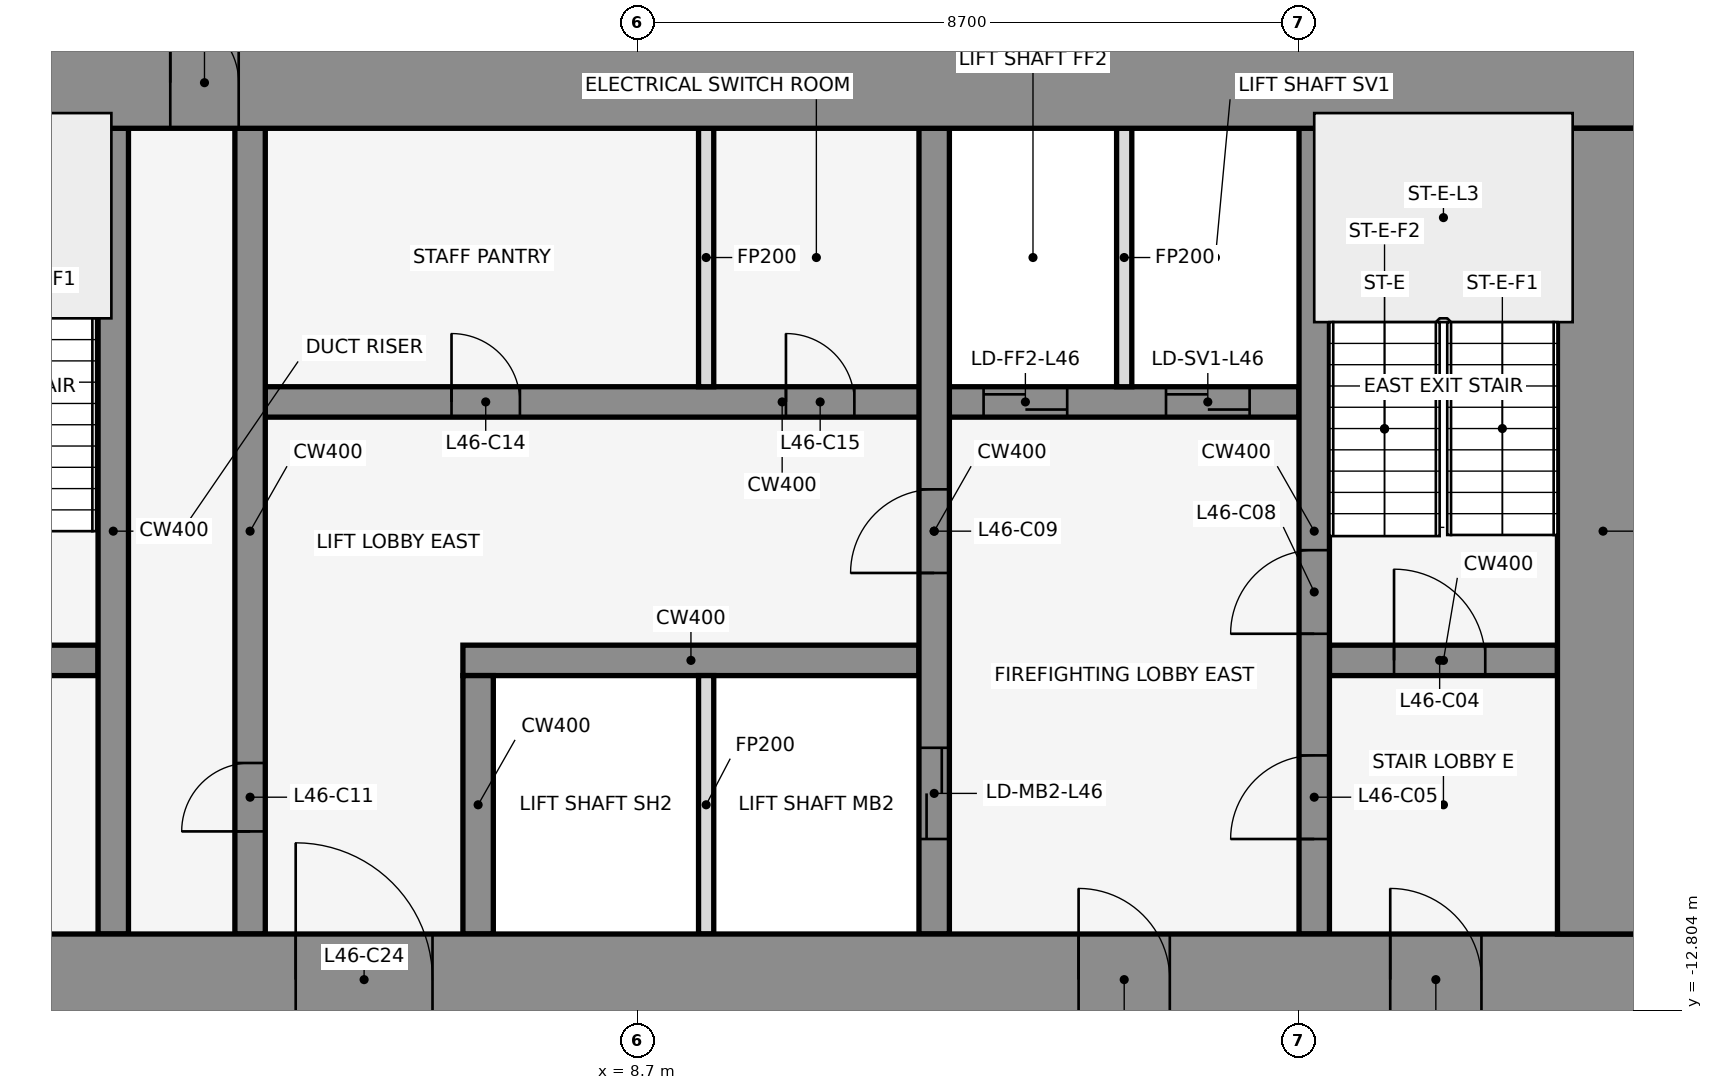
"""IFC4 building model, lengths in metres.
Left out: names, types, materials, properties, quantities, classifications, styles, units other than length and angle.
Written with IfcOpenShell. Run it as: python <this file> out.ifc"""

import sys

from ifc_helpers import new_model, si_unit, direction, frame, frame_2d, origin, place, context, subcontext, project, spatial, rectangle, extrude, element, fill, save


model = new_model("IFC4")
c1 = context("Model", 3, precision=1e-05, world=origin(), true_north=direction((0.0, 1.0)))
c2 = subcontext(c1, "Body", "Model", "MODEL_VIEW")
j1 = project(units=[si_unit("LENGTHUNIT", "METRE"), si_unit("PLANEANGLEUNIT", "RADIAN")], contexts=[c1])
p1 = place(None, origin())
s1 = spatial("IfcSite", under=j1, at=p1, CompositionType="ELEMENT")
p2 = place(p1, origin())
s2 = spatial("IfcBuilding", under=s1, at=p2, CompositionType="ELEMENT")
p3 = place(p2, frame((0.0, 0.0, 207.3)))
s3 = spatial("IfcBuildingStorey", under=s2, at=p3, CompositionType="ELEMENT", Elevation=207.3)
for number, where, z_axis, x_axis in (
    (1, (16.432, -0.105, 0.0), (0.0, 0.0, 1.0), (-0.84, 0.543, 0.0)),
    (2, (1.901, 1.08, 0.0), (0.0, 0.0, 1.0), (-0.84, -0.543, 0.0)),
):
    element("IfcWall", number, at=place(p3, frame(where, z_axis=z_axis, x_axis=x_axis)), inside=s3, PredefinedType="STANDARD", context=c2, shape_type="SweptSolid", body=[
        extrude(rectangle(XDim=2.183, YDim=0.25, at=frame_2d((1.091, 0.0))), origin(), (0.0, 0.0, 1.0), 3.95),
    ])
p4 = place(p3, frame((-1.6, -8.2, 0.0), z_axis=(0.0, 0.0, 1.0), x_axis=(1.0, 0.0, 0.0)))
e3 = element("IfcWall", 3, at=p4, inside=s3, PredefinedType="SHEAR", context=c2, shape_type="SweptSolid", body=[
    extrude(rectangle(XDim=3.2, YDim=0.4, at=frame_2d((1.6, 0.0))), origin(), (0.0, 0.0, 1.0), 4.1),
])
p5 = place(p4, frame((1.05, 0.0, 0.0)))
e4 = element("IfcOpeningElement", 4, at=p5, cuts=e3, PredefinedType="OPENING", context=c2, shape_type="SweptSolid", body=[
    extrude(rectangle(XDim=1.2, YDim=2.1, at=frame_2d((0.6, 1.05))), frame((0.0, 0.212, 0.0), z_axis=(0.0, -1.0, 0.0), x_axis=(1.0, 0.0, 0.0)), (0.0, 0.0, 1.0), 0.424),
])
p6 = place(p3, frame((6.4, -8.2, 0.0), z_axis=(0.0, 0.0, 1.0), x_axis=(1.0, 0.0, 0.0)))
e5 = element("IfcWall", 5, at=p6, inside=s3, PredefinedType="SHEAR", context=c2, shape_type="SweptSolid", body=[
    extrude(rectangle(XDim=6.0, YDim=0.4, at=frame_2d((3.0, 0.0))), origin(), (0.0, 0.0, 1.0), 4.1),
])
p7 = place(p3, frame((17.8, -8.2, 0.0), z_axis=(0.0, 0.0, 1.0), x_axis=(1.0, 0.0, 0.0)))
e6 = element("IfcWall", 6, at=p7, inside=s3, PredefinedType="SHEAR", context=c2, shape_type="SweptSolid", body=[
    extrude(rectangle(XDim=3.0, YDim=0.4, at=frame_2d((1.5, 0.0))), origin(), (0.0, 0.0, 1.0), 4.1),
])
p8 = place(p7, frame((0.85, 0.0, 0.0)))
e7 = element("IfcOpeningElement", 7, at=p8, cuts=e6, PredefinedType="OPENING", context=c2, shape_type="SweptSolid", body=[
    extrude(rectangle(XDim=1.2, YDim=2.1, at=frame_2d((0.6, 1.05))), frame((0.0, 0.212, 0.0), z_axis=(0.0, -1.0, 0.0), x_axis=(1.0, 0.0, 0.0)), (0.0, 0.0, 1.0), 0.424),
])
p9 = place(p3, frame((3.8, -4.8, 0.0), z_axis=(0.0, 0.0, 1.0), x_axis=(1.0, 0.0, 0.0)))
e8 = element("IfcWall", 8, at=p9, inside=s3, PredefinedType="SHEAR", context=c2, shape_type="SweptSolid", body=[
    extrude(rectangle(XDim=13.6, YDim=0.4, at=frame_2d((6.8, 0.0))), origin(), (0.0, 0.0, 1.0), 4.1),
])
p10 = place(p9, frame((9.45, 0.0, 0.0)))
e9 = element("IfcOpeningElement", 9, at=p10, cuts=e8, PredefinedType="OPENING", context=c2, shape_type="SweptSolid", body=[
    extrude(rectangle(XDim=1.1, YDim=2.1, at=frame_2d((0.55, 1.05))), frame((0.0, 0.212, 0.0), z_axis=(0.0, -1.0, 0.0), x_axis=(1.0, 0.0, 0.0)), (0.0, 0.0, 1.0), 0.424),
])
p11 = place(p9, frame((11.85, 0.0, 0.0)))
e10 = element("IfcOpeningElement", 10, at=p11, cuts=e8, PredefinedType="OPENING", context=c2, shape_type="SweptSolid", body=[
    extrude(rectangle(XDim=1.1, YDim=2.1, at=frame_2d((0.55, 1.05))), frame((0.0, 0.212, 0.0), z_axis=(0.0, -1.0, 0.0), x_axis=(1.0, 0.0, 0.0)), (0.0, 0.0, 1.0), 0.424),
])
p12 = place(p9, frame((2.45, 0.0, 0.0)))
e11 = element("IfcOpeningElement", 11, at=p12, cuts=e8, PredefinedType="OPENING", context=c2, shape_type="SweptSolid", body=[
    extrude(rectangle(XDim=0.9, YDim=2.1, at=frame_2d((0.45, 1.05))), frame((0.0, 0.212, 0.0), z_axis=(0.0, -1.0, 0.0), x_axis=(1.0, 0.0, 0.0)), (0.0, 0.0, 1.0), 0.424),
])
p13 = place(p9, frame((6.85, 0.0, 0.0)))
e12 = element("IfcOpeningElement", 12, at=p13, cuts=e8, PredefinedType="OPENING", context=c2, shape_type="SweptSolid", body=[
    extrude(rectangle(XDim=0.9, YDim=2.1, at=frame_2d((0.45, 1.05))), frame((0.0, 0.212, 0.0), z_axis=(0.0, -1.0, 0.0), x_axis=(1.0, 0.0, 0.0)), (0.0, 0.0, 1.0), 0.424),
])
p14 = place(p3, frame((1.8, -11.8, 0.0), z_axis=(0.0, 0.0, 1.0), x_axis=(0.0, 1.0, 0.0)))
e13 = element("IfcWall", 13, at=p14, inside=s3, PredefinedType="SHEAR", context=c2, shape_type="SweptSolid", body=[
    extrude(rectangle(XDim=10.6, YDim=0.4, at=frame_2d((5.3, 0.0))), origin(), (0.0, 0.0, 1.0), 4.1),
])
p15 = place(p3, frame((3.6, -11.8, 0.0), z_axis=(0.0, 0.0, 1.0), x_axis=(0.0, 1.0, 0.0)))
e14 = element("IfcWall", 14, at=p15, inside=s3, PredefinedType="SHEAR", context=c2, shape_type="SweptSolid", body=[
    extrude(rectangle(XDim=10.6, YDim=0.4, at=frame_2d((5.3, 0.0))), origin(), (0.0, 0.0, 1.0), 4.1),
])
p16 = place(p15, frame((1.35, 0.0, 0.0)))
e15 = element("IfcOpeningElement", 15, at=p16, cuts=e14, PredefinedType="OPENING", context=c2, shape_type="SweptSolid", body=[
    extrude(rectangle(XDim=0.9, YDim=2.1, at=frame_2d((0.45, 1.05))), frame((0.0, 0.212, 0.0), z_axis=(0.0, -1.0, 0.0), x_axis=(1.0, 0.0, 0.0)), (0.0, 0.0, 1.0), 0.424),
])
p17 = place(p3, frame((6.6, -11.8, 0.0), z_axis=(0.0, 0.0, 1.0), x_axis=(0.0, 1.0, 0.0)))
e16 = element("IfcWall", 16, at=p17, inside=s3, PredefinedType="SHEAR", context=c2, shape_type="SweptSolid", body=[
    extrude(rectangle(XDim=3.4, YDim=0.4, at=frame_2d((1.7, 0.0))), origin(), (0.0, 0.0, 1.0), 4.1),
])
for number, where, z_axis, x_axis in (
    (17, (9.6, -11.8, 0.0), (0.0, 0.0, 1.0), (0.0, 1.0, 0.0)),
    (18, (9.6, -4.6, 0.0), (0.0, 0.0, 1.0), (0.0, 1.0, 0.0)),
):
    element("IfcWall", number, at=place(p3, frame(where, z_axis=z_axis, x_axis=x_axis)), inside=s3, PredefinedType="PARTITIONING", context=c2, shape_type="SweptSolid", body=[
        extrude(rectangle(XDim=3.4, YDim=0.2, at=frame_2d((1.7, 0.0))), origin(), (0.0, 0.0, 1.0), 2.84),
    ])
p18 = place(p3, frame((12.6, -11.8, 0.0), z_axis=(0.0, 0.0, 1.0), x_axis=(0.0, 1.0, 0.0)))
e19 = element("IfcWall", 19, at=p18, inside=s3, PredefinedType="SHEAR", context=c2, shape_type="SweptSolid", body=[
    extrude(rectangle(XDim=10.6, YDim=0.4, at=frame_2d((5.3, 0.0))), origin(), (0.0, 0.0, 1.0), 4.1),
])
p19 = place(p18, frame((1.25, 0.0, 0.0)))
e20 = element("IfcOpeningElement", 20, at=p19, cuts=e19, PredefinedType="OPENING", context=c2, shape_type="SweptSolid", body=[
    extrude(rectangle(XDim=1.2, YDim=2.1, at=frame_2d((0.6, 1.05))), frame((0.0, 0.212, 0.0), z_axis=(0.0, -1.0, 0.0), x_axis=(1.0, 0.0, 0.0)), (0.0, 0.0, 1.0), 0.424),
])
p20 = place(p18, frame((4.75, 0.0, 0.0)))
e21 = element("IfcOpeningElement", 21, at=p20, cuts=e19, PredefinedType="OPENING", context=c2, shape_type="SweptSolid", body=[
    extrude(rectangle(XDim=1.1, YDim=2.1, at=frame_2d((0.55, 1.05))), frame((0.0, 0.212, 0.0), z_axis=(0.0, -1.0, 0.0), x_axis=(1.0, 0.0, 0.0)), (0.0, 0.0, 1.0), 0.424),
])
p21 = place(p3, frame((15.1, -4.6, 0.0), z_axis=(0.0, 0.0, 1.0), x_axis=(0.0, 1.0, 0.0)))
e22 = element("IfcWall", 22, at=p21, inside=s3, PredefinedType="PARTITIONING", context=c2, shape_type="SweptSolid", body=[
    extrude(rectangle(XDim=3.4, YDim=0.2, at=frame_2d((1.7, 0.0))), origin(), (0.0, 0.0, 1.0), 2.84),
])
p22 = place(p3, frame((17.6, -11.8, 0.0), z_axis=(0.0, 0.0, 1.0), x_axis=(0.0, 1.0, 0.0)))
e23 = element("IfcWall", 23, at=p22, inside=s3, PredefinedType="SHEAR", context=c2, shape_type="SweptSolid", body=[
    extrude(rectangle(XDim=10.6, YDim=0.4, at=frame_2d((5.3, 0.0))), origin(), (0.0, 0.0, 1.0), 4.1),
])
p23 = place(p22, frame((1.25, 0.0, 0.0)))
e24 = element("IfcOpeningElement", 24, at=p23, cuts=e23, PredefinedType="OPENING", context=c2, shape_type="SweptSolid", body=[
    extrude(rectangle(XDim=1.1, YDim=2.1, at=frame_2d((0.55, 1.05))), frame((0.0, 0.212, 0.0), z_axis=(0.0, -1.0, 0.0), x_axis=(1.0, 0.0, 0.0)), (0.0, 0.0, 1.0), 0.424),
])
p24 = place(p22, frame((3.95, 0.0, 0.0)))
e25 = element("IfcOpeningElement", 25, at=p24, cuts=e23, PredefinedType="OPENING", context=c2, shape_type="SweptSolid", body=[
    extrude(rectangle(XDim=1.1, YDim=2.1, at=frame_2d((0.55, 1.05))), frame((0.0, 0.212, 0.0), z_axis=(0.0, -1.0, 0.0), x_axis=(1.0, 0.0, 0.0)), (0.0, 0.0, 1.0), 0.424),
])
p25 = place(p3, frame((-22.0, -0.6, 0.0), z_axis=(0.0, 0.0, 1.0), x_axis=(1.0, 0.0, 0.0)))
e26 = element("IfcWall", 26, at=p25, inside=s3, PredefinedType="SHEAR", context=c2, shape_type="SweptSolid", body=[
    extrude(rectangle(XDim=44.0, YDim=1.2, at=frame_2d((22.0, 0.0))), origin(), (0.0, 0.0, 1.0), 4.1),
])
p26 = place(p25, frame((18.55, 0.0, 0.0)))
e27 = element("IfcOpeningElement", 27, at=p26, cuts=e26, PredefinedType="OPENING", context=c2, shape_type="SweptSolid", body=[
    extrude(rectangle(XDim=0.9, YDim=2.1, at=frame_2d((0.45, 1.05))), frame((0.0, 0.612, 0.0), z_axis=(0.0, -1.0, 0.0), x_axis=(1.0, 0.0, 0.0)), (0.0, 0.0, 1.0), 1.224),
])
p27 = place(p25, frame((24.55, 0.0, 0.0)))
e28 = element("IfcOpeningElement", 28, at=p27, cuts=e26, PredefinedType="OPENING", context=c2, shape_type="SweptSolid", body=[
    extrude(rectangle(XDim=0.9, YDim=2.1, at=frame_2d((0.45, 1.05))), frame((0.0, 0.612, 0.0), z_axis=(0.0, -1.0, 0.0), x_axis=(1.0, 0.0, 0.0)), (0.0, 0.0, 1.0), 1.224),
])
p28 = place(p3, frame((-22.0, -12.4, 0.0), z_axis=(0.0, 0.0, 1.0), x_axis=(1.0, 0.0, 0.0)))
e29 = element("IfcWall", 29, at=p28, inside=s3, PredefinedType="SHEAR", context=c2, shape_type="SweptSolid", body=[
    extrude(rectangle(XDim=44.0, YDim=1.2, at=frame_2d((22.0, 0.0))), origin(), (0.0, 0.0, 1.0), 4.1),
])
p29 = place(p28, frame((2.2, 0.0, 0.0)))
e30 = element("IfcOpeningElement", 30, at=p29, cuts=e29, PredefinedType="OPENING", context=c2, shape_type="SweptSolid", body=[
    extrude(rectangle(XDim=1.2, YDim=2.1, at=frame_2d((0.6, 1.05))), frame((0.0, 0.612, 0.0), z_axis=(0.0, -1.0, 0.0), x_axis=(1.0, 0.0, 0.0)), (0.0, 0.0, 1.0), 1.224),
])
p30 = place(p28, frame((21.4, 0.0, 0.0)))
e31 = element("IfcOpeningElement", 31, at=p30, cuts=e29, PredefinedType="OPENING", context=c2, shape_type="SweptSolid", body=[
    extrude(rectangle(XDim=1.2, YDim=2.1, at=frame_2d((0.6, 1.05))), frame((0.0, 0.612, 0.0), z_axis=(0.0, -1.0, 0.0), x_axis=(1.0, 0.0, 0.0)), (0.0, 0.0, 1.0), 1.224),
])
p31 = place(p28, frame((40.6, 0.0, 0.0)))
e32 = element("IfcOpeningElement", 32, at=p31, cuts=e29, PredefinedType="OPENING", context=c2, shape_type="SweptSolid", body=[
    extrude(rectangle(XDim=1.2, YDim=2.1, at=frame_2d((0.6, 1.05))), frame((0.0, 0.612, 0.0), z_axis=(0.0, -1.0, 0.0), x_axis=(1.0, 0.0, 0.0)), (0.0, 0.0, 1.0), 1.224),
])
p32 = place(p28, frame((16.0, 0.0, 0.0)))
e33 = element("IfcOpeningElement", 33, at=p32, cuts=e29, PredefinedType="OPENING", context=c2, shape_type="SweptSolid", body=[
    extrude(rectangle(XDim=1.8, YDim=2.1, at=frame_2d((0.9, 1.05))), frame((0.0, 0.612, 0.0), z_axis=(0.0, -1.0, 0.0), x_axis=(1.0, 0.0, 0.0)), (0.0, 0.0, 1.0), 1.224),
])
p33 = place(p28, frame((6.3, 0.0, 0.0)))
e34 = element("IfcOpeningElement", 34, at=p33, cuts=e29, PredefinedType="OPENING", context=c2, shape_type="SweptSolid", body=[
    extrude(rectangle(XDim=1.2, YDim=2.1, at=frame_2d((0.6, 1.05))), frame((0.0, 0.612, 0.0), z_axis=(0.0, -1.0, 0.0), x_axis=(1.0, 0.0, 0.0)), (0.0, 0.0, 1.0), 1.224),
])
p34 = place(p28, frame((26.2, 0.0, 0.0)))
e35 = element("IfcOpeningElement", 35, at=p34, cuts=e29, PredefinedType="OPENING", context=c2, shape_type="SweptSolid", body=[
    extrude(rectangle(XDim=1.8, YDim=2.1, at=frame_2d((0.9, 1.05))), frame((0.0, 0.612, 0.0), z_axis=(0.0, -1.0, 0.0), x_axis=(1.0, 0.0, 0.0)), (0.0, 0.0, 1.0), 1.224),
])
p35 = place(p28, frame((36.5, 0.0, 0.0)))
e36 = element("IfcOpeningElement", 36, at=p35, cuts=e29, PredefinedType="OPENING", context=c2, shape_type="SweptSolid", body=[
    extrude(rectangle(XDim=1.2, YDim=2.1, at=frame_2d((0.6, 1.05))), frame((0.0, 0.612, 0.0), z_axis=(0.0, -1.0, 0.0), x_axis=(1.0, 0.0, 0.0)), (0.0, 0.0, 1.0), 1.224),
])
p36 = place(p3, frame((21.4, -11.8, 0.0), z_axis=(0.0, 0.0, 1.0), x_axis=(0.0, 1.0, 0.0)))
e37 = element("IfcWall", 37, at=p36, inside=s3, PredefinedType="SHEAR", context=c2, shape_type="SweptSolid", body=[
    extrude(rectangle(XDim=10.6, YDim=1.2, at=frame_2d((5.3, 0.0))), origin(), (0.0, 0.0, 1.0), 4.1),
])
p37 = place(p8, origin())
e38 = element("IfcDoor", 38, at=p37, inside=s3, OperationType="SINGLE_SWING_RIGHT", PredefinedType="DOOR", context=c2, shape_type="SweptSolid", body=[
    extrude(rectangle(XDim=1.2, YDim=2.1, at=frame_2d((0.6, 1.05))), frame((0.0, 0.025, 0.0), z_axis=(0.0, -1.0, 0.0), x_axis=(1.0, 0.0, 0.0)), (0.0, 0.0, 1.0), 0.05),
])
fill(e7, e38)
p38 = place(p23, origin())
e39 = element("IfcDoor", 39, at=p38, inside=s3, OperationType="SINGLE_SWING_LEFT", PredefinedType="DOOR", context=c2, shape_type="SweptSolid", body=[
    extrude(rectangle(XDim=1.1, YDim=2.1, at=frame_2d((0.55, 1.05))), frame((0.0, 0.025, 0.0), z_axis=(0.0, -1.0, 0.0), x_axis=(1.0, 0.0, 0.0)), (0.0, 0.0, 1.0), 0.05),
])
fill(e24, e39)
p39 = place(p19, origin())
e40 = element("IfcDoor", 40, at=p39, inside=s3, OperationType="DOUBLE_DOOR_SLIDING", PredefinedType="DOOR", context=c2, shape_type="SweptSolid", body=[
    extrude(rectangle(XDim=1.2, YDim=2.1, at=frame_2d((0.6, 1.05))), frame((0.0, 0.025, 0.0), z_axis=(0.0, -1.0, 0.0), x_axis=(1.0, 0.0, 0.0)), (0.0, 0.0, 1.0), 0.05),
])
fill(e20, e40)
p40 = place(p10, origin())
e41 = element("IfcDoor", 41, at=p40, inside=s3, OperationType="DOUBLE_DOOR_SLIDING", PredefinedType="DOOR", context=c2, shape_type="SweptSolid", body=[
    extrude(rectangle(XDim=1.1, YDim=2.1, at=frame_2d((0.55, 1.05))), frame((0.0, 0.025, 0.0), z_axis=(0.0, -1.0, 0.0), x_axis=(1.0, 0.0, 0.0)), (0.0, 0.0, 1.0), 0.05),
])
fill(e9, e41)
p41 = place(p11, origin())
e42 = element("IfcDoor", 42, at=p41, inside=s3, OperationType="DOUBLE_DOOR_SLIDING", PredefinedType="DOOR", context=c2, shape_type="SweptSolid", body=[
    extrude(rectangle(XDim=1.1, YDim=2.1, at=frame_2d((0.55, 1.05))), frame((0.0, 0.025, 0.0), z_axis=(0.0, -1.0, 0.0), x_axis=(1.0, 0.0, 0.0)), (0.0, 0.0, 1.0), 0.05),
])
fill(e10, e42)
p42 = place(p24, origin())
e43 = element("IfcDoor", 43, at=p42, inside=s3, OperationType="SINGLE_SWING_RIGHT", PredefinedType="DOOR", context=c2, shape_type="SweptSolid", body=[
    extrude(rectangle(XDim=1.1, YDim=2.1, at=frame_2d((0.55, 1.05))), frame((0.0, 0.025, 0.0), z_axis=(0.0, -1.0, 0.0), x_axis=(1.0, 0.0, 0.0)), (0.0, 0.0, 1.0), 0.05),
])
fill(e25, e43)
p43 = place(p20, frame((1.1, 0.0, 0.0), z_axis=(0.0, 0.0, 1.0), x_axis=(-1.0, 0.0, 0.0)))
e44 = element("IfcDoor", 44, at=p43, inside=s3, OperationType="SINGLE_SWING_RIGHT", PredefinedType="DOOR", context=c2, shape_type="SweptSolid", body=[
    extrude(rectangle(XDim=1.1, YDim=2.1, at=frame_2d((0.55, 1.05))), frame((0.0, 0.025, 0.0), z_axis=(0.0, -1.0, 0.0), x_axis=(1.0, 0.0, 0.0)), (0.0, 0.0, 1.0), 0.05),
])
fill(e21, e44)
p44 = place(p16, origin())
e45 = element("IfcDoor", 45, at=p44, inside=s3, OperationType="SINGLE_SWING_LEFT", PredefinedType="DOOR", context=c2, shape_type="SweptSolid", body=[
    extrude(rectangle(XDim=0.9, YDim=2.1, at=frame_2d((0.45, 1.05))), frame((0.0, 0.025, 0.0), z_axis=(0.0, -1.0, 0.0), x_axis=(1.0, 0.0, 0.0)), (0.0, 0.0, 1.0), 0.05),
])
fill(e15, e45)
p45 = place(p12, origin())
e46 = element("IfcDoor", 46, at=p45, inside=s3, OperationType="SINGLE_SWING_RIGHT", PredefinedType="DOOR", context=c2, shape_type="SweptSolid", body=[
    extrude(rectangle(XDim=0.9, YDim=2.1, at=frame_2d((0.45, 1.05))), frame((0.0, 0.025, 0.0), z_axis=(0.0, -1.0, 0.0), x_axis=(1.0, 0.0, 0.0)), (0.0, 0.0, 1.0), 0.05),
])
fill(e11, e46)
p46 = place(p13, origin())
e47 = element("IfcDoor", 47, at=p46, inside=s3, OperationType="SINGLE_SWING_LEFT", PredefinedType="DOOR", context=c2, shape_type="SweptSolid", body=[
    extrude(rectangle(XDim=0.9, YDim=2.1, at=frame_2d((0.45, 1.05))), frame((0.0, 0.025, 0.0), z_axis=(0.0, -1.0, 0.0), x_axis=(1.0, 0.0, 0.0)), (0.0, 0.0, 1.0), 0.05),
])
fill(e12, e47)
p47 = place(p27, origin())
e48 = element("IfcDoor", 48, at=p47, inside=s3, OperationType="SINGLE_SWING_LEFT", PredefinedType="DOOR", context=c2, shape_type="SweptSolid", body=[
    extrude(rectangle(XDim=0.9, YDim=2.1, at=frame_2d((0.45, 1.05))), frame((0.0, 0.025, 0.0), z_axis=(0.0, -1.0, 0.0), x_axis=(1.0, 0.0, 0.0)), (0.0, 0.0, 1.0), 0.05),
])
fill(e28, e48)
p48 = place(p31, frame((1.2, 0.0, 0.0), z_axis=(0.0, 0.0, 1.0), x_axis=(-1.0, 0.0, 0.0)))
e49 = element("IfcDoor", 49, at=p48, inside=s3, OperationType="SINGLE_SWING_RIGHT", PredefinedType="DOOR", context=c2, shape_type="SweptSolid", body=[
    extrude(rectangle(XDim=1.2, YDim=2.1, at=frame_2d((0.6, 1.05))), frame((0.0, 0.025, 0.0), z_axis=(0.0, -1.0, 0.0), x_axis=(1.0, 0.0, 0.0)), (0.0, 0.0, 1.0), 0.05),
])
fill(e32, e49)
p49 = place(p34, origin())
e50 = element("IfcDoor", 50, at=p49, inside=s3, OperationType="SINGLE_SWING_LEFT", PredefinedType="DOOR", context=c2, shape_type="SweptSolid", body=[
    extrude(rectangle(XDim=1.8, YDim=2.1, at=frame_2d((0.9, 1.05))), frame((0.0, 0.025, 0.0), z_axis=(0.0, -1.0, 0.0), x_axis=(1.0, 0.0, 0.0)), (0.0, 0.0, 1.0), 0.05),
])
fill(e35, e50)
p50 = place(p35, frame((1.2, 0.0, 0.0), z_axis=(0.0, 0.0, 1.0), x_axis=(-1.0, 0.0, 0.0)))
e51 = element("IfcDoor", 51, at=p50, inside=s3, OperationType="SINGLE_SWING_RIGHT", PredefinedType="DOOR", context=c2, shape_type="SweptSolid", body=[
    extrude(rectangle(XDim=1.2, YDim=2.1, at=frame_2d((0.6, 1.05))), frame((0.0, 0.025, 0.0), z_axis=(0.0, -1.0, 0.0), x_axis=(1.0, 0.0, 0.0)), (0.0, 0.0, 1.0), 0.05),
])
fill(e36, e51)
save(model, sys.argv[1])
